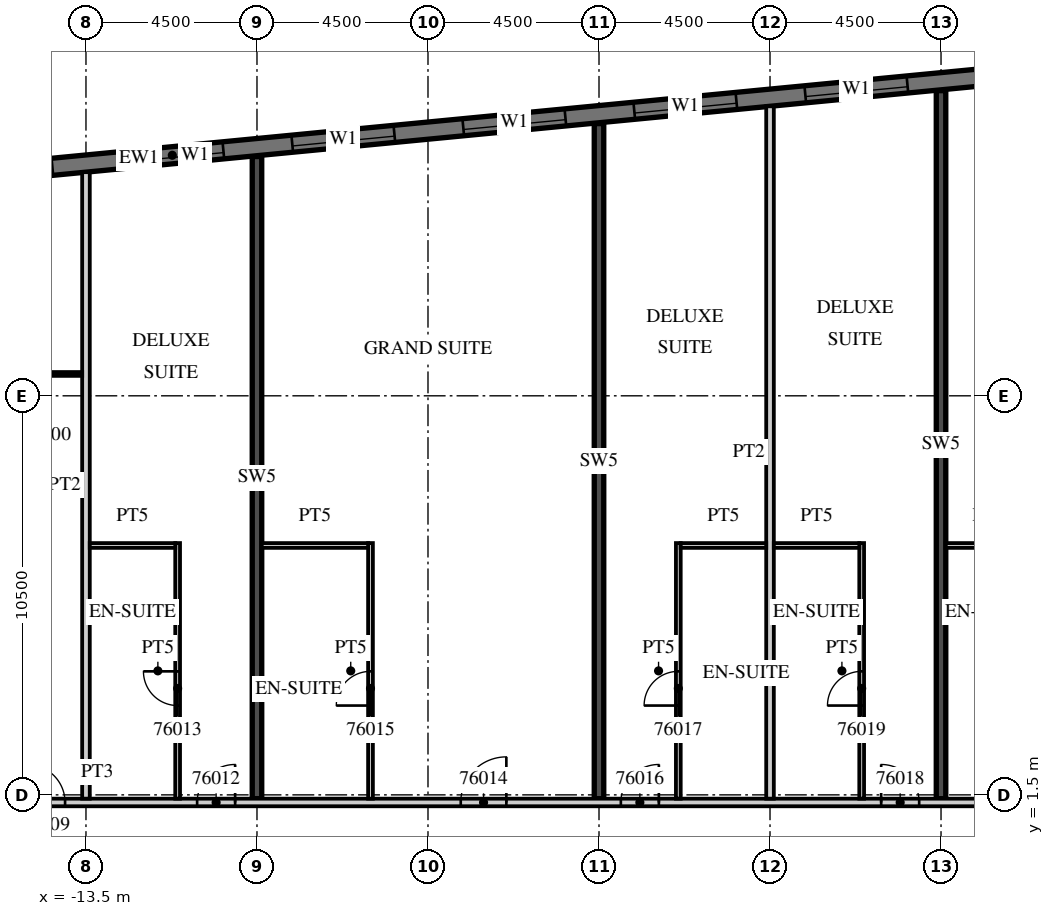
"""IFC4 building model, lengths in metres.
Left out: names, types, materials, properties, quantities, classifications, styles, units other than length and angle.
Written with IfcOpenShell. Run it as: python <this file> out.ifc"""

import sys

from ifc_helpers import new_model, si_unit, direction, frame, frame_2d, origin, place, context, subcontext, project, spatial, rectangle, extrude, element, fill, save


model = new_model("IFC4")
c1 = context("Model", 3, precision=1e-05, world=origin(), true_north=direction((0.0, 1.0)))
c2 = subcontext(c1, "Body", "Model", "MODEL_VIEW")
j1 = project(units=[si_unit("LENGTHUNIT", "METRE"), si_unit("PLANEANGLEUNIT", "RADIAN")], contexts=[c1])
p1 = place(None, origin())
s1 = spatial("IfcSite", under=j1, at=p1, CompositionType="ELEMENT")
p2 = place(p1, origin())
s2 = spatial("IfcBuilding", under=s1, at=p2, CompositionType="ELEMENT")
p3 = place(p2, frame((0.0, 0.0, 301.5)))
s3 = spatial("IfcBuildingStorey", under=s2, at=p3, CompositionType="ELEMENT", Elevation=301.5)
p4 = place(p3, frame((-9.0, 1.4, 0.0), z_axis=(0.0, 0.0, 1.0), x_axis=(0.0, 1.0, 0.0)))
e1 = element("IfcWall", 1, at=p4, inside=s3, PredefinedType="SHEAR", context=c2, shape_type="SweptSolid", body=[
    extrude(rectangle(XDim=16.896, YDim=0.25, at=frame_2d((8.448, 0.0))), origin(), (0.0, 0.0, 1.0), 3.3),
])
p5 = place(p3, frame((0.0, 1.4, 0.0), z_axis=(0.0, 0.0, 1.0), x_axis=(0.0, 1.0, 0.0)))
e2 = element("IfcWall", 2, at=p5, inside=s3, PredefinedType="SHEAR", context=c2, shape_type="SweptSolid", body=[
    extrude(rectangle(XDim=17.763, YDim=0.25, at=frame_2d((8.881, 0.0))), origin(), (0.0, 0.0, 1.0), 3.3),
])
p6 = place(p3, frame((9.0, 1.4, 0.0), z_axis=(0.0, 0.0, 1.0), x_axis=(0.0, 1.0, 0.0)))
e3 = element("IfcWall", 3, at=p6, inside=s3, PredefinedType="SHEAR", context=c2, shape_type="SweptSolid", body=[
    extrude(rectangle(XDim=18.629, YDim=0.25, at=frame_2d((9.315, 0.0))), origin(), (0.0, 0.0, 1.0), 3.3),
])
p7 = place(p3, frame((13.521, 20.713, 0.0), z_axis=(0.0, 0.0, 1.0), x_axis=(-0.995396277313, -0.095844932638, 0.0)))
e4 = element("IfcWall", 4, at=p7, inside=s3, PredefinedType="SOLIDWALL", context=c2, shape_type="SweptSolid", body=[
    extrude(rectangle(XDim=51.495, YDim=0.45, at=frame_2d((25.748, 0.0))), origin(), (0.0, 0.0, 1.0), 3.02),
])
p8 = place(p7, frame((0.91, 0.0, 0.45)))
e5 = element("IfcOpeningElement", 5, at=p8, cuts=e4, PredefinedType="OPENING", context=c2, shape_type="SweptSolid", body=[
    extrude(rectangle(XDim=2.7, YDim=2.25, at=frame_2d((1.35, 1.125))), frame((0.0, 0.235, 0.0), z_axis=(0.0, -1.0, 0.0), x_axis=(1.0, 0.0, 0.0)), (0.0, 0.0, 1.0), 0.47),
])
p9 = place(p7, frame((5.431, 0.0, 0.45)))
e6 = element("IfcOpeningElement", 6, at=p9, cuts=e4, PredefinedType="OPENING", context=c2, shape_type="SweptSolid", body=[
    extrude(rectangle(XDim=2.7, YDim=2.25, at=frame_2d((1.35, 1.125))), frame((0.0, 0.235, 0.0), z_axis=(0.0, -1.0, 0.0), x_axis=(1.0, 0.0, 0.0)), (0.0, 0.0, 1.0), 0.47),
])
p10 = place(p7, frame((9.952, 0.0, 0.45)))
e7 = element("IfcOpeningElement", 7, at=p10, cuts=e4, PredefinedType="OPENING", context=c2, shape_type="SweptSolid", body=[
    extrude(rectangle(XDim=2.7, YDim=2.25, at=frame_2d((1.35, 1.125))), frame((0.0, 0.235, 0.0), z_axis=(0.0, -1.0, 0.0), x_axis=(1.0, 0.0, 0.0)), (0.0, 0.0, 1.0), 0.47),
])
p11 = place(p7, frame((14.473, 0.0, 0.45)))
e8 = element("IfcOpeningElement", 8, at=p11, cuts=e4, PredefinedType="OPENING", context=c2, shape_type="SweptSolid", body=[
    extrude(rectangle(XDim=2.7, YDim=2.25, at=frame_2d((1.35, 1.125))), frame((0.0, 0.235, 0.0), z_axis=(0.0, -1.0, 0.0), x_axis=(1.0, 0.0, 0.0)), (0.0, 0.0, 1.0), 0.47),
])
p12 = place(p7, frame((18.994, 0.0, 0.45)))
e9 = element("IfcOpeningElement", 9, at=p12, cuts=e4, PredefinedType="OPENING", context=c2, shape_type="SweptSolid", body=[
    extrude(rectangle(XDim=2.7, YDim=2.25, at=frame_2d((1.35, 1.125))), frame((0.0, 0.235, 0.0), z_axis=(0.0, -1.0, 0.0), x_axis=(1.0, 0.0, 0.0)), (0.0, 0.0, 1.0), 0.47),
])
p13 = place(p7, frame((23.514, 0.0, 0.45)))
e10 = element("IfcOpeningElement", 10, at=p13, cuts=e4, PredefinedType="OPENING", context=c2, shape_type="SweptSolid", body=[
    extrude(rectangle(XDim=2.7, YDim=2.25, at=frame_2d((1.35, 1.125))), frame((0.0, 0.235, 0.0), z_axis=(0.0, -1.0, 0.0), x_axis=(1.0, 0.0, 0.0)), (0.0, 0.0, 1.0), 0.47),
])
p14 = place(p7, frame((28.035, 0.0, 0.45)))
e11 = element("IfcOpeningElement", 11, at=p14, cuts=e4, PredefinedType="OPENING", context=c2, shape_type="SweptSolid", body=[
    extrude(rectangle(XDim=2.7, YDim=2.25, at=frame_2d((1.35, 1.125))), frame((0.0, 0.235, 0.0), z_axis=(0.0, -1.0, 0.0), x_axis=(1.0, 0.0, 0.0)), (0.0, 0.0, 1.0), 0.47),
])
p15 = place(p7, frame((32.556, 0.0, 0.45)))
e12 = element("IfcOpeningElement", 12, at=p15, cuts=e4, PredefinedType="OPENING", context=c2, shape_type="SweptSolid", body=[
    extrude(rectangle(XDim=2.7, YDim=2.25, at=frame_2d((1.35, 1.125))), frame((0.0, 0.235, 0.0), z_axis=(0.0, -1.0, 0.0), x_axis=(1.0, 0.0, 0.0)), (0.0, 0.0, 1.0), 0.47),
])
p16 = place(p7, frame((37.077, 0.0, 0.45)))
e13 = element("IfcOpeningElement", 13, at=p16, cuts=e4, PredefinedType="OPENING", context=c2, shape_type="SweptSolid", body=[
    extrude(rectangle(XDim=2.7, YDim=2.25, at=frame_2d((1.35, 1.125))), frame((0.0, 0.235, 0.0), z_axis=(0.0, -1.0, 0.0), x_axis=(1.0, 0.0, 0.0)), (0.0, 0.0, 1.0), 0.47),
])
p17 = place(p7, frame((41.598, 0.0, 0.45)))
e14 = element("IfcOpeningElement", 14, at=p17, cuts=e4, PredefinedType="OPENING", context=c2, shape_type="SweptSolid", body=[
    extrude(rectangle(XDim=2.7, YDim=2.25, at=frame_2d((1.35, 1.125))), frame((0.0, 0.235, 0.0), z_axis=(0.0, -1.0, 0.0), x_axis=(1.0, 0.0, 0.0)), (0.0, 0.0, 1.0), 0.47),
])
p18 = place(p7, frame((46.118, 0.0, 0.45)))
e15 = element("IfcOpeningElement", 15, at=p18, cuts=e4, PredefinedType="OPENING", context=c2, shape_type="SweptSolid", body=[
    extrude(rectangle(XDim=2.7, YDim=2.25, at=frame_2d((1.35, 1.125))), frame((0.0, 0.235, 0.0), z_axis=(0.0, -1.0, 0.0), x_axis=(1.0, 0.0, 0.0)), (0.0, 0.0, 1.0), 0.47),
])
p19 = place(p3, frame((-39.909, 1.3, 0.0), z_axis=(0.0, 0.0, 1.0), x_axis=(1.0, 0.0, 0.0)))
e16 = element("IfcWall", 16, at=p19, inside=s3, PredefinedType="PARTITIONING", context=c2, shape_type="SweptSolid", body=[
    extrude(rectangle(XDim=53.409, YDim=0.2, at=frame_2d((26.705, 0.0))), origin(), (0.0, 0.0, 1.0), 3.02),
])
p20 = place(p19, frame((0.15, 0.0, 0.0)))
e17 = element("IfcOpeningElement", 17, at=p20, cuts=e16, PredefinedType="OPENING", context=c2, shape_type="SweptSolid", body=[
    extrude(rectangle(XDim=0.9, YDim=2.1, at=frame_2d((0.45, 1.05))), frame((0.0, 0.11, 0.0), z_axis=(0.0, -1.0, 0.0), x_axis=(1.0, 0.0, 0.0)), (0.0, 0.0, 1.0), 0.22),
])
p21 = place(p19, frame((9.271, 0.0, 0.0)))
e18 = element("IfcOpeningElement", 18, at=p21, cuts=e16, PredefinedType="OPENING", context=c2, shape_type="SweptSolid", body=[
    extrude(rectangle(XDim=1.2, YDim=2.1, at=frame_2d((0.6, 1.05))), frame((0.0, 0.11, 0.0), z_axis=(0.0, -1.0, 0.0), x_axis=(1.0, 0.0, 0.0)), (0.0, 0.0, 1.0), 0.22),
])
p22 = place(p19, frame((13.484, 0.0, 0.0)))
e19 = element("IfcOpeningElement", 19, at=p22, cuts=e16, PredefinedType="OPENING", context=c2, shape_type="SweptSolid", body=[
    extrude(rectangle(XDim=1.0, YDim=2.1, at=frame_2d((0.5, 1.05))), frame((0.0, 0.11, 0.0), z_axis=(0.0, -1.0, 0.0), x_axis=(1.0, 0.0, 0.0)), (0.0, 0.0, 1.0), 0.22),
])
p23 = place(p19, frame((17.959, 0.0, 0.0)))
e20 = element("IfcOpeningElement", 20, at=p23, cuts=e16, PredefinedType="OPENING", context=c2, shape_type="SweptSolid", body=[
    extrude(rectangle(XDim=1.0, YDim=2.1, at=frame_2d((0.5, 1.05))), frame((0.0, 0.11, 0.0), z_axis=(0.0, -1.0, 0.0), x_axis=(1.0, 0.0, 0.0)), (0.0, 0.0, 1.0), 0.22),
])
p24 = place(p19, frame((24.859, 0.0, 0.0)))
e21 = element("IfcOpeningElement", 21, at=p24, cuts=e16, PredefinedType="OPENING", context=c2, shape_type="SweptSolid", body=[
    extrude(rectangle(XDim=1.0, YDim=2.1, at=frame_2d((0.5, 1.05))), frame((0.0, 0.11, 0.0), z_axis=(0.0, -1.0, 0.0), x_axis=(1.0, 0.0, 0.0)), (0.0, 0.0, 1.0), 0.22),
])
p25 = place(p19, frame((29.334, 0.0, 0.0)))
e22 = element("IfcOpeningElement", 22, at=p25, cuts=e16, PredefinedType="OPENING", context=c2, shape_type="SweptSolid", body=[
    extrude(rectangle(XDim=1.0, YDim=2.1, at=frame_2d((0.5, 1.05))), frame((0.0, 0.11, 0.0), z_axis=(0.0, -1.0, 0.0), x_axis=(1.0, 0.0, 0.0)), (0.0, 0.0, 1.0), 0.22),
])
p26 = place(p19, frame((36.271, 0.0, 0.0)))
e23 = element("IfcOpeningElement", 23, at=p26, cuts=e16, PredefinedType="OPENING", context=c2, shape_type="SweptSolid", body=[
    extrude(rectangle(XDim=1.2, YDim=2.1, at=frame_2d((0.6, 1.05))), frame((0.0, 0.11, 0.0), z_axis=(0.0, -1.0, 0.0), x_axis=(1.0, 0.0, 0.0)), (0.0, 0.0, 1.0), 0.22),
])
p27 = place(p19, frame((40.484, 0.0, 0.0)))
e24 = element("IfcOpeningElement", 24, at=p27, cuts=e16, PredefinedType="OPENING", context=c2, shape_type="SweptSolid", body=[
    extrude(rectangle(XDim=1.0, YDim=2.1, at=frame_2d((0.5, 1.05))), frame((0.0, 0.11, 0.0), z_axis=(0.0, -1.0, 0.0), x_axis=(1.0, 0.0, 0.0)), (0.0, 0.0, 1.0), 0.22),
])
p28 = place(p19, frame((47.334, 0.0, 0.0)))
e25 = element("IfcOpeningElement", 25, at=p28, cuts=e16, PredefinedType="OPENING", context=c2, shape_type="SweptSolid", body=[
    extrude(rectangle(XDim=1.0, YDim=2.1, at=frame_2d((0.5, 1.05))), frame((0.0, 0.11, 0.0), z_axis=(0.0, -1.0, 0.0), x_axis=(1.0, 0.0, 0.0)), (0.0, 0.0, 1.0), 0.22),
])
p29 = place(p19, frame((51.834, 0.0, 0.0)))
e26 = element("IfcOpeningElement", 26, at=p29, cuts=e16, PredefinedType="OPENING", context=c2, shape_type="SweptSolid", body=[
    extrude(rectangle(XDim=1.0, YDim=2.1, at=frame_2d((0.5, 1.05))), frame((0.0, 0.11, 0.0), z_axis=(0.0, -1.0, 0.0), x_axis=(1.0, 0.0, 0.0)), (0.0, 0.0, 1.0), 0.22),
])
p30 = place(p3, frame((-13.5, 1.4, 0.0), z_axis=(0.0, 0.0, 1.0), x_axis=(0.0, 1.0, 0.0)))
e27 = element("IfcWall", 27, at=p30, inside=s3, PredefinedType="PARTITIONING", context=c2, shape_type="SweptSolid", body=[
    extrude(rectangle(XDim=16.485, YDim=0.2, at=frame_2d((8.243, 0.0))), origin(), (0.0, 0.0, 1.0), 3.02),
])
p31 = place(p3, frame((-17.875, 12.575, 0.0), z_axis=(0.0, 0.0, 1.0), x_axis=(1.0, 0.0, 0.0)))
e28 = element("IfcWall", 28, at=p31, inside=s3, PredefinedType="PARTITIONING", context=c2, shape_type="SweptSolid", body=[
    extrude(rectangle(XDim=4.275, YDim=0.1, at=frame_2d((2.137, 0.0))), origin(), (0.0, 0.0, 1.0), 3.02),
])
p32 = place(p31, frame((1.387, 0.0, 0.0)))
e29 = element("IfcOpeningElement", 29, at=p32, cuts=e28, PredefinedType="OPENING", context=c2, shape_type="SweptSolid", body=[
    extrude(rectangle(XDim=1.5, YDim=2.1, at=frame_2d((0.75, 1.05))), frame((0.0, 0.06, 0.0), z_axis=(0.0, -1.0, 0.0), x_axis=(1.0, 0.0, 0.0)), (0.0, 0.0, 1.0), 0.12),
])
p33 = place(p3, frame((-11.088, 1.4, 0.0), z_axis=(0.0, 0.0, 1.0), x_axis=(0.0, 1.0, 0.0)))
e30 = element("IfcWall", 30, at=p33, inside=s3, PredefinedType="PARTITIONING", context=c2, shape_type="SweptSolid", body=[
    extrude(rectangle(XDim=6.725, YDim=0.125, at=frame_2d((3.363, 0.0))), origin(), (0.0, 0.0, 1.0), 3.02),
])
p34 = place(p33, frame((2.45, 0.0, 0.0)))
e31 = element("IfcOpeningElement", 31, at=p34, cuts=e30, PredefinedType="OPENING", context=c2, shape_type="SweptSolid", body=[
    extrude(rectangle(XDim=0.9, YDim=2.1, at=frame_2d((0.45, 1.05))), frame((0.0, 0.073, 0.0), z_axis=(0.0, -1.0, 0.0), x_axis=(1.0, 0.0, 0.0)), (0.0, 0.0, 1.0), 0.145),
])
p35 = place(p3, frame((-13.4, 8.062, 0.0), z_axis=(0.0, 0.0, 1.0), x_axis=(1.0, 0.0, 0.0)))
e32 = element("IfcWall", 32, at=p35, inside=s3, PredefinedType="PARTITIONING", context=c2, shape_type="SweptSolid", body=[
    extrude(rectangle(XDim=2.25, YDim=0.125, at=frame_2d((1.125, 0.0))), origin(), (0.0, 0.0, 1.0), 3.02),
])
p36 = place(p3, frame((-6.013, 1.4, 0.0), z_axis=(0.0, 0.0, 1.0), x_axis=(0.0, 1.0, 0.0)))
e33 = element("IfcWall", 33, at=p36, inside=s3, PredefinedType="PARTITIONING", context=c2, shape_type="SweptSolid", body=[
    extrude(rectangle(XDim=6.725, YDim=0.125, at=frame_2d((3.363, 0.0))), origin(), (0.0, 0.0, 1.0), 3.02),
])
p37 = place(p36, frame((2.45, 0.0, 0.0)))
e34 = element("IfcOpeningElement", 34, at=p37, cuts=e33, PredefinedType="OPENING", context=c2, shape_type="SweptSolid", body=[
    extrude(rectangle(XDim=0.9, YDim=2.1, at=frame_2d((0.45, 1.05))), frame((0.0, 0.073, 0.0), z_axis=(0.0, -1.0, 0.0), x_axis=(1.0, 0.0, 0.0)), (0.0, 0.0, 1.0), 0.145),
])
p38 = place(p3, frame((-8.875, 8.062, 0.0), z_axis=(0.0, 0.0, 1.0), x_axis=(1.0, 0.0, 0.0)))
e35 = element("IfcWall", 35, at=p38, inside=s3, PredefinedType="PARTITIONING", context=c2, shape_type="SweptSolid", body=[
    extrude(rectangle(XDim=2.8, YDim=0.125, at=frame_2d((1.4, 0.0))), origin(), (0.0, 0.0, 1.0), 3.02),
])
p39 = place(p3, frame((4.5, 1.4, 0.0), z_axis=(0.0, 0.0, 1.0), x_axis=(0.0, 1.0, 0.0)))
e36 = element("IfcWall", 36, at=p39, inside=s3, PredefinedType="PARTITIONING", context=c2, shape_type="SweptSolid", body=[
    extrude(rectangle(XDim=18.218, YDim=0.2, at=frame_2d((9.109, 0.0))), origin(), (0.0, 0.0, 1.0), 3.02),
])
p40 = place(p3, frame((2.087, 1.4, 0.0), z_axis=(0.0, 0.0, 1.0), x_axis=(0.0, 1.0, 0.0)))
e37 = element("IfcWall", 37, at=p40, inside=s3, PredefinedType="PARTITIONING", context=c2, shape_type="SweptSolid", body=[
    extrude(rectangle(XDim=6.725, YDim=0.125, at=frame_2d((3.363, 0.0))), origin(), (0.0, 0.0, 1.0), 3.02),
])
p41 = place(p40, frame((2.45, 0.0, 0.0)))
e38 = element("IfcOpeningElement", 38, at=p41, cuts=e37, PredefinedType="OPENING", context=c2, shape_type="SweptSolid", body=[
    extrude(rectangle(XDim=0.9, YDim=2.1, at=frame_2d((0.45, 1.05))), frame((0.0, 0.073, 0.0), z_axis=(0.0, -1.0, 0.0), x_axis=(1.0, 0.0, 0.0)), (0.0, 0.0, 1.0), 0.145),
])
p42 = place(p3, frame((2.15, 8.062, 0.0), z_axis=(0.0, 0.0, 1.0), x_axis=(1.0, 0.0, 0.0)))
e39 = element("IfcWall", 39, at=p42, inside=s3, PredefinedType="PARTITIONING", context=c2, shape_type="SweptSolid", body=[
    extrude(rectangle(XDim=2.25, YDim=0.125, at=frame_2d((1.125, 0.0))), origin(), (0.0, 0.0, 1.0), 3.02),
])
p43 = place(p3, frame((6.912, 1.4, 0.0), z_axis=(0.0, 0.0, 1.0), x_axis=(0.0, 1.0, 0.0)))
e40 = element("IfcWall", 40, at=p43, inside=s3, PredefinedType="PARTITIONING", context=c2, shape_type="SweptSolid", body=[
    extrude(rectangle(XDim=6.725, YDim=0.125, at=frame_2d((3.363, 0.0))), origin(), (0.0, 0.0, 1.0), 3.02),
])
p44 = place(p43, frame((2.45, 0.0, 0.0)))
e41 = element("IfcOpeningElement", 41, at=p44, cuts=e40, PredefinedType="OPENING", context=c2, shape_type="SweptSolid", body=[
    extrude(rectangle(XDim=0.9, YDim=2.1, at=frame_2d((0.45, 1.05))), frame((0.0, 0.073, 0.0), z_axis=(0.0, -1.0, 0.0), x_axis=(1.0, 0.0, 0.0)), (0.0, 0.0, 1.0), 0.145),
])
for number, where, z_axis, x_axis in (
    (42, (4.6, 8.062, 0.0), (0.0, 0.0, 1.0), (1.0, 0.0, 0.0)),
    (43, (9.125, 8.062, 0.0), (0.0, 0.0, 1.0), (1.0, 0.0, 0.0)),
):
    element("IfcWall", number, at=place(p3, frame(where, z_axis=z_axis, x_axis=x_axis)), inside=s3, PredefinedType="PARTITIONING", context=c2, shape_type="SweptSolid", body=[
        extrude(rectangle(XDim=2.25, YDim=0.125, at=frame_2d((1.125, 0.0))), origin(), (0.0, 0.0, 1.0), 3.02),
    ])
p45 = place(p9, origin())
e44 = element("IfcWindow", 44, at=p45, inside=s3, PartitioningType="SINGLE_PANEL", PredefinedType="WINDOW", context=c2, shape_type="SweptSolid", body=[
    extrude(rectangle(XDim=2.7, YDim=2.25, at=frame_2d((1.35, 1.125))), frame((0.0, 0.09, 0.0), z_axis=(0.0, -1.0, 0.0), x_axis=(1.0, 0.0, 0.0)), (0.0, 0.0, 1.0), 0.06),
])
fill(e6, e44)
p46 = place(p10, origin())
e45 = element("IfcWindow", 45, at=p46, inside=s3, PartitioningType="SINGLE_PANEL", PredefinedType="WINDOW", context=c2, shape_type="SweptSolid", body=[
    extrude(rectangle(XDim=2.7, YDim=2.25, at=frame_2d((1.35, 1.125))), frame((0.0, 0.09, 0.0), z_axis=(0.0, -1.0, 0.0), x_axis=(1.0, 0.0, 0.0)), (0.0, 0.0, 1.0), 0.06),
])
fill(e7, e45)
p47 = place(p11, origin())
e46 = element("IfcWindow", 46, at=p47, inside=s3, PartitioningType="SINGLE_PANEL", PredefinedType="WINDOW", context=c2, shape_type="SweptSolid", body=[
    extrude(rectangle(XDim=2.7, YDim=2.25, at=frame_2d((1.35, 1.125))), frame((0.0, 0.09, 0.0), z_axis=(0.0, -1.0, 0.0), x_axis=(1.0, 0.0, 0.0)), (0.0, 0.0, 1.0), 0.06),
])
fill(e8, e46)
p48 = place(p12, origin())
e47 = element("IfcWindow", 47, at=p48, inside=s3, PartitioningType="SINGLE_PANEL", PredefinedType="WINDOW", context=c2, shape_type="SweptSolid", body=[
    extrude(rectangle(XDim=2.7, YDim=2.25, at=frame_2d((1.35, 1.125))), frame((0.0, 0.09, 0.0), z_axis=(0.0, -1.0, 0.0), x_axis=(1.0, 0.0, 0.0)), (0.0, 0.0, 1.0), 0.06),
])
fill(e9, e47)
p49 = place(p13, origin())
e48 = element("IfcWindow", 48, at=p49, inside=s3, PartitioningType="SINGLE_PANEL", PredefinedType="WINDOW", context=c2, shape_type="SweptSolid", body=[
    extrude(rectangle(XDim=2.7, YDim=2.25, at=frame_2d((1.35, 1.125))), frame((0.0, 0.09, 0.0), z_axis=(0.0, -1.0, 0.0), x_axis=(1.0, 0.0, 0.0)), (0.0, 0.0, 1.0), 0.06),
])
fill(e10, e48)
p50 = place(p14, origin())
e49 = element("IfcWindow", 49, at=p50, inside=s3, PartitioningType="SINGLE_PANEL", PredefinedType="WINDOW", context=c2, shape_type="SweptSolid", body=[
    extrude(rectangle(XDim=2.7, YDim=2.25, at=frame_2d((1.35, 1.125))), frame((0.0, 0.09, 0.0), z_axis=(0.0, -1.0, 0.0), x_axis=(1.0, 0.0, 0.0)), (0.0, 0.0, 1.0), 0.06),
])
fill(e11, e49)
p51 = place(p24, origin())
e50 = element("IfcDoor", 50, at=p51, inside=s3, OperationType="SINGLE_SWING_LEFT", PredefinedType="DOOR", context=c2, shape_type="SweptSolid", body=[
    extrude(rectangle(XDim=1.0, YDim=2.1, at=frame_2d((0.5, 1.05))), frame((0.0, 0.025, 0.0), z_axis=(0.0, -1.0, 0.0), x_axis=(1.0, 0.0, 0.0)), (0.0, 0.0, 1.0), 0.05),
])
fill(e21, e50)
p52 = place(p25, origin())
e51 = element("IfcDoor", 51, at=p52, inside=s3, OperationType="SINGLE_SWING_RIGHT", PredefinedType="DOOR", context=c2, shape_type="SweptSolid", body=[
    extrude(rectangle(XDim=1.0, YDim=2.1, at=frame_2d((0.5, 1.05))), frame((0.0, 0.025, 0.0), z_axis=(0.0, -1.0, 0.0), x_axis=(1.0, 0.0, 0.0)), (0.0, 0.0, 1.0), 0.05),
])
fill(e22, e51)
p53 = place(p34, origin())
e52 = element("IfcDoor", 52, at=p53, inside=s3, OperationType="SINGLE_SWING_RIGHT", PredefinedType="DOOR", context=c2, shape_type="SweptSolid", body=[
    extrude(rectangle(XDim=0.9, YDim=2.1, at=frame_2d((0.45, 1.05))), frame((0.0, 0.025, 0.0), z_axis=(0.0, -1.0, 0.0), x_axis=(1.0, 0.0, 0.0)), (0.0, 0.0, 1.0), 0.05),
])
fill(e31, e52)
p54 = place(p26, origin())
e53 = element("IfcDoor", 53, at=p54, inside=s3, OperationType="SINGLE_SWING_RIGHT", PredefinedType="DOOR", context=c2, shape_type="SweptSolid", body=[
    extrude(rectangle(XDim=1.2, YDim=2.1, at=frame_2d((0.6, 1.05))), frame((0.0, 0.025, 0.0), z_axis=(0.0, -1.0, 0.0), x_axis=(1.0, 0.0, 0.0)), (0.0, 0.0, 1.0), 0.05),
])
fill(e23, e53)
p55 = place(p37, origin())
e54 = element("IfcDoor", 54, at=p55, inside=s3, OperationType="SINGLE_SWING_LEFT", PredefinedType="DOOR", context=c2, shape_type="SweptSolid", body=[
    extrude(rectangle(XDim=0.9, YDim=2.1, at=frame_2d((0.45, 1.05))), frame((0.0, 0.025, 0.0), z_axis=(0.0, -1.0, 0.0), x_axis=(1.0, 0.0, 0.0)), (0.0, 0.0, 1.0), 0.05),
])
fill(e34, e54)
p56 = place(p27, origin())
e55 = element("IfcDoor", 55, at=p56, inside=s3, OperationType="SINGLE_SWING_RIGHT", PredefinedType="DOOR", context=c2, shape_type="SweptSolid", body=[
    extrude(rectangle(XDim=1.0, YDim=2.1, at=frame_2d((0.5, 1.05))), frame((0.0, 0.025, 0.0), z_axis=(0.0, -1.0, 0.0), x_axis=(1.0, 0.0, 0.0)), (0.0, 0.0, 1.0), 0.05),
])
fill(e24, e55)
p57 = place(p41, origin())
e56 = element("IfcDoor", 56, at=p57, inside=s3, OperationType="SINGLE_SWING_LEFT", PredefinedType="DOOR", context=c2, shape_type="SweptSolid", body=[
    extrude(rectangle(XDim=0.9, YDim=2.1, at=frame_2d((0.45, 1.05))), frame((0.0, 0.025, 0.0), z_axis=(0.0, -1.0, 0.0), x_axis=(1.0, 0.0, 0.0)), (0.0, 0.0, 1.0), 0.05),
])
fill(e38, e56)
p58 = place(p28, origin())
e57 = element("IfcDoor", 57, at=p58, inside=s3, OperationType="SINGLE_SWING_LEFT", PredefinedType="DOOR", context=c2, shape_type="SweptSolid", body=[
    extrude(rectangle(XDim=1.0, YDim=2.1, at=frame_2d((0.5, 1.05))), frame((0.0, 0.025, 0.0), z_axis=(0.0, -1.0, 0.0), x_axis=(1.0, 0.0, 0.0)), (0.0, 0.0, 1.0), 0.05),
])
fill(e25, e57)
p59 = place(p44, origin())
e58 = element("IfcDoor", 58, at=p59, inside=s3, OperationType="SINGLE_SWING_LEFT", PredefinedType="DOOR", context=c2, shape_type="SweptSolid", body=[
    extrude(rectangle(XDim=0.9, YDim=2.1, at=frame_2d((0.45, 1.05))), frame((0.0, 0.025, 0.0), z_axis=(0.0, -1.0, 0.0), x_axis=(1.0, 0.0, 0.0)), (0.0, 0.0, 1.0), 0.05),
])
fill(e41, e58)
save(model, sys.argv[1])
